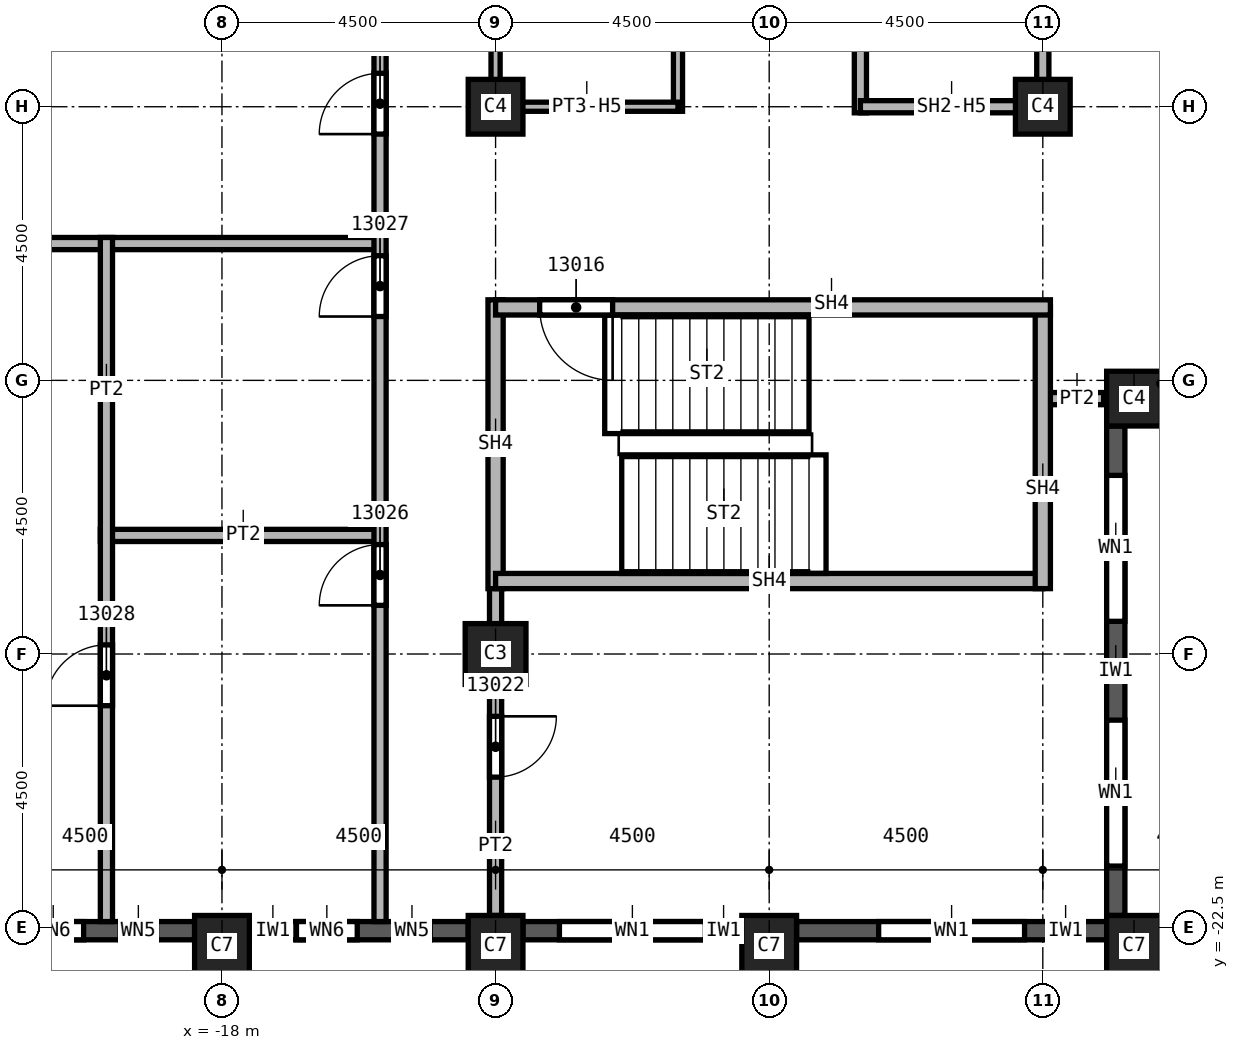
"""IFC4 building model, lengths in metres.
Left out: names, types, materials, properties, quantities, classifications, styles, units other than length and angle.
Written with IfcOpenShell. Run it as: python <this file> out.ifc"""

import sys

from ifc_helpers import new_model, si_unit, direction, frame, frame_2d, origin, origin_2d, place, context, subcontext, project, spatial, rectangle, extrude, element, fill, save


model = new_model("IFC4")
c1 = context("Model", 3, precision=1e-05, world=origin(), true_north=direction((0.0, 1.0)))
c2 = subcontext(c1, "Body", "Model", "MODEL_VIEW")
j1 = project(units=[si_unit("LENGTHUNIT", "METRE"), si_unit("PLANEANGLEUNIT", "RADIAN")], contexts=[c1])
p1 = place(None, origin())
s1 = spatial("IfcSite", under=j1, at=p1, CompositionType="ELEMENT")
p2 = place(p1, origin())
s2 = spatial("IfcBuilding", under=s1, at=p2, CompositionType="ELEMENT")
p3 = place(p2, frame((0.0, 0.0, 208.0)))
s3 = spatial("IfcBuildingStorey", under=s2, at=p3, CompositionType="ELEMENT", Elevation=208.0)
p4 = place(p3, frame((-13.5, -18.0, 0.0), z_axis=(0.0, 0.0, 1.0), x_axis=(1.0, 0.0, 0.0)))
e1 = element("IfcColumn", 1, at=p4, inside=s3, PredefinedType="COLUMN", context=c2, shape_type="SweptSolid", body=[
    extrude(rectangle(XDim=1.0, YDim=1.0, at=origin_2d()), origin(), (0.0, 0.0, 1.0), 3.72),
])
for number, where, z_axis, x_axis in (
    (2, (-4.5, -9.0, 0.0), (0.0, 0.0, 1.0), (1.0, 0.0, 0.0)),
    (3, (-13.5, -9.0, 0.0), (0.0, 0.0, 1.0), (1.0, 0.0, 0.0)),
):
    element("IfcColumn", number, at=place(p3, frame(where, z_axis=z_axis, x_axis=x_axis)), inside=s3, PredefinedType="COLUMN", context=c2, shape_type="SweptSolid", body=[
        extrude(rectangle(XDim=0.9, YDim=0.9, at=origin_2d()), origin(), (0.0, 0.0, 1.0), 3.72),
    ])
for number, where, z_axis, x_axis in (
    (4, (-3.0, -22.8, 0.0), (0.0, 0.0, 1.0), (1.0, 0.0, 0.0)),
    (5, (-9.0, -22.8, 0.0), (0.0, 0.0, 1.0), (1.0, 0.0, 0.0)),
    (6, (-13.5, -22.8, 0.0), (0.0, 0.0, 1.0), (1.0, 0.0, 0.0)),
    (7, (-18.0, -22.8, 0.0), (0.0, 0.0, 1.0), (1.0, 0.0, 0.0)),
):
    element("IfcColumn", number, at=place(p3, frame(where, z_axis=z_axis, x_axis=x_axis)), inside=s3, PredefinedType="COLUMN", context=c2, shape_type="SweptSolid", body=[
        extrude(rectangle(XDim=0.9, YDim=1.0, at=origin_2d()), origin(), (0.0, 0.0, 1.0), 3.72),
    ])
p5 = place(p3, frame((-3.0, -13.8, 0.0), z_axis=(0.0, 0.0, 1.0), x_axis=(1.0, 0.0, 0.0)))
e8 = element("IfcColumn", 8, at=p5, inside=s3, PredefinedType="COLUMN", context=c2, shape_type="SweptSolid", body=[
    extrude(rectangle(XDim=0.9, YDim=0.9, at=origin_2d()), origin(), (0.0, 0.0, 1.0), 3.72),
])
p6 = place(p3, frame((-22.05, -22.55, 0.0), z_axis=(0.0, 0.0, 1.0), x_axis=(1.0, 0.0, 0.0)))
e9 = element("IfcWall", 9, at=p6, inside=s3, PredefinedType="SOLIDWALL", context=c2, shape_type="SweptSolid", body=[
    extrude(rectangle(XDim=3.6, YDim=0.3, at=frame_2d((1.8, 0.0))), origin(), (0.0, 0.0, 1.0), 3.12),
])
p7 = place(p6, frame((0.775, 0.0, 0.8)))
e10 = element("IfcOpeningElement", 10, at=p7, cuts=e9, PredefinedType="OPENING", context=c2, shape_type="SweptSolid", body=[
    extrude(rectangle(XDim=1.0, YDim=1.95, at=frame_2d((0.5, 0.975))), frame((0.0, 0.15, 0.0), z_axis=(0.0, -1.0, 0.0), x_axis=(1.0, 0.0, 0.0)), (0.0, 0.0, 1.0), 0.3),
])
p8 = place(p6, frame((2.375, 0.0, 0.8)))
e11 = element("IfcOpeningElement", 11, at=p8, cuts=e9, PredefinedType="OPENING", context=c2, shape_type="SweptSolid", body=[
    extrude(rectangle(XDim=0.6, YDim=1.95, at=frame_2d((0.3, 0.975))), frame((0.0, 0.15, 0.0), z_axis=(0.0, -1.0, 0.0), x_axis=(1.0, 0.0, 0.0)), (0.0, 0.0, 1.0), 0.3),
])
p9 = place(p3, frame((-17.55, -22.55, 0.0), z_axis=(0.0, 0.0, 1.0), x_axis=(1.0, 0.0, 0.0)))
e12 = element("IfcWall", 12, at=p9, inside=s3, PredefinedType="SOLIDWALL", context=c2, shape_type="SweptSolid", body=[
    extrude(rectangle(XDim=3.6, YDim=0.3, at=frame_2d((1.8, 0.0))), origin(), (0.0, 0.0, 1.0), 3.12),
])
p10 = place(p9, frame((0.775, 0.0, 0.8)))
e13 = element("IfcOpeningElement", 13, at=p10, cuts=e12, PredefinedType="OPENING", context=c2, shape_type="SweptSolid", body=[
    extrude(rectangle(XDim=1.0, YDim=1.95, at=frame_2d((0.5, 0.975))), frame((0.0, 0.15, 0.0), z_axis=(0.0, -1.0, 0.0), x_axis=(1.0, 0.0, 0.0)), (0.0, 0.0, 1.0), 0.3),
])
p11 = place(p9, frame((2.375, 0.0, 0.8)))
e14 = element("IfcOpeningElement", 14, at=p11, cuts=e12, PredefinedType="OPENING", context=c2, shape_type="SweptSolid", body=[
    extrude(rectangle(XDim=0.6, YDim=1.95, at=frame_2d((0.3, 0.975))), frame((0.0, 0.15, 0.0), z_axis=(0.0, -1.0, 0.0), x_axis=(1.0, 0.0, 0.0)), (0.0, 0.0, 1.0), 0.3),
])
p12 = place(p3, frame((-13.05, -22.55, 0.0), z_axis=(0.0, 0.0, 1.0), x_axis=(1.0, 0.0, 0.0)))
e15 = element("IfcWall", 15, at=p12, inside=s3, PredefinedType="SOLIDWALL", context=c2, shape_type="SweptSolid", body=[
    extrude(rectangle(XDim=3.6, YDim=0.3, at=frame_2d((1.8, 0.0))), origin(), (0.0, 0.0, 1.0), 3.12),
])
p13 = place(p12, frame((0.6, 0.0, 0.8)))
e16 = element("IfcOpeningElement", 16, at=p13, cuts=e15, PredefinedType="OPENING", context=c2, shape_type="SweptSolid", body=[
    extrude(rectangle(XDim=2.4, YDim=1.95, at=frame_2d((1.2, 0.975))), frame((0.0, 0.15, 0.0), z_axis=(0.0, -1.0, 0.0), x_axis=(1.0, 0.0, 0.0)), (0.0, 0.0, 1.0), 0.3),
])
p14 = place(p3, frame((-8.55, -22.55, 0.0), z_axis=(0.0, 0.0, 1.0), x_axis=(1.0, 0.0, 0.0)))
e17 = element("IfcWall", 17, at=p14, inside=s3, PredefinedType="SOLIDWALL", context=c2, shape_type="SweptSolid", body=[
    extrude(rectangle(XDim=5.1, YDim=0.3, at=frame_2d((2.55, 0.0))), origin(), (0.0, 0.0, 1.0), 3.12),
])
p15 = place(p14, frame((1.35, 0.0, 0.8)))
e18 = element("IfcOpeningElement", 18, at=p15, cuts=e17, PredefinedType="OPENING", context=c2, shape_type="SweptSolid", body=[
    extrude(rectangle(XDim=2.4, YDim=1.95, at=frame_2d((1.2, 0.975))), frame((0.0, 0.15, 0.0), z_axis=(0.0, -1.0, 0.0), x_axis=(1.0, 0.0, 0.0)), (0.0, 0.0, 1.0), 0.3),
])
p16 = place(p3, frame((-3.3, -22.3, 0.0), z_axis=(0.0, 0.0, 1.0), x_axis=(0.0, 1.0, 0.0)))
e19 = element("IfcWall", 19, at=p16, inside=s3, PredefinedType="SOLIDWALL", context=c2, shape_type="SweptSolid", body=[
    extrude(rectangle(XDim=8.05, YDim=0.3, at=frame_2d((4.025, 0.0))), origin(), (0.0, 0.0, 1.0), 3.12),
])
p17 = place(p16, frame((0.812, 0.0, 0.8)))
e20 = element("IfcOpeningElement", 20, at=p17, cuts=e19, PredefinedType="OPENING", context=c2, shape_type="SweptSolid", body=[
    extrude(rectangle(XDim=2.4, YDim=1.95, at=frame_2d((1.2, 0.975))), frame((0.0, 0.15, 0.0), z_axis=(0.0, -1.0, 0.0), x_axis=(1.0, 0.0, 0.0)), (0.0, 0.0, 1.0), 0.3),
])
p18 = place(p16, frame((4.837, 0.0, 0.8)))
e21 = element("IfcOpeningElement", 21, at=p18, cuts=e19, PredefinedType="OPENING", context=c2, shape_type="SweptSolid", body=[
    extrude(rectangle(XDim=2.4, YDim=1.95, at=frame_2d((1.2, 0.975))), frame((0.0, 0.15, 0.0), z_axis=(0.0, -1.0, 0.0), x_axis=(1.0, 0.0, 0.0)), (0.0, 0.0, 1.0), 0.3),
])
p19 = place(p3, frame((-27.1, -11.25, 0.0), z_axis=(0.0, 0.0, 1.0), x_axis=(1.0, 0.0, 0.0)))
e22 = element("IfcWall", 22, at=p19, inside=s3, PredefinedType="PARTITIONING", context=c2, shape_type="SweptSolid", body=[
    extrude(rectangle(XDim=11.7, YDim=0.2, at=frame_2d((5.85, 0.0))), origin(), (0.0, 0.0, 1.0), 3.72),
])
p20 = place(p3, frame((-20.0, -16.05, 0.0), z_axis=(0.0, 0.0, 1.0), x_axis=(1.0, 0.0, 0.0)))
e23 = element("IfcWall", 23, at=p20, inside=s3, PredefinedType="PARTITIONING", context=c2, shape_type="SweptSolid", body=[
    extrude(rectangle(XDim=4.6, YDim=0.2, at=frame_2d((2.3, 0.0))), origin(), (0.0, 0.0, 1.0), 3.72),
])
p21 = place(p3, frame((-19.9, -22.4, 0.0), z_axis=(0.0, 0.0, 1.0), x_axis=(0.0, 1.0, 0.0)))
e24 = element("IfcWall", 24, at=p21, inside=s3, PredefinedType="PARTITIONING", context=c2, shape_type="SweptSolid", body=[
    extrude(rectangle(XDim=11.25, YDim=0.2, at=frame_2d((5.625, 0.0))), origin(), (0.0, 0.0, 1.0), 3.72),
])
p22 = place(p21, frame((3.55, 0.0, 0.0)))
e25 = element("IfcOpeningElement", 25, at=p22, cuts=e24, PredefinedType="OPENING", context=c2, shape_type="SweptSolid", body=[
    extrude(rectangle(XDim=1.0, YDim=2.1, at=frame_2d((0.5, 1.05))), frame((0.0, 0.1, 0.0), z_axis=(0.0, -1.0, 0.0), x_axis=(1.0, 0.0, 0.0)), (0.0, 0.0, 1.0), 0.2),
])
p23 = place(p3, frame((-15.4, -22.4, 0.0), z_axis=(0.0, 0.0, 1.0), x_axis=(0.0, 1.0, 0.0)))
e26 = element("IfcWall", 26, at=p23, inside=s3, PredefinedType="PARTITIONING", context=c2, shape_type="SweptSolid", body=[
    extrude(rectangle(XDim=23.25, YDim=0.2, at=frame_2d((11.625, 0.0))), origin(), (0.0, 0.0, 1.0), 3.72),
])
p24 = place(p23, frame((5.2, 0.0, 0.0)))
e27 = element("IfcOpeningElement", 27, at=p24, cuts=e26, PredefinedType="OPENING", context=c2, shape_type="SweptSolid", body=[
    extrude(rectangle(XDim=1.0, YDim=2.1, at=frame_2d((0.5, 1.05))), frame((0.0, 0.1, 0.0), z_axis=(0.0, -1.0, 0.0), x_axis=(1.0, 0.0, 0.0)), (0.0, 0.0, 1.0), 0.2),
])
p25 = place(p23, frame((9.95, 0.0, 0.0)))
e28 = element("IfcOpeningElement", 28, at=p25, cuts=e26, PredefinedType="OPENING", context=c2, shape_type="SweptSolid", body=[
    extrude(rectangle(XDim=1.0, YDim=2.1, at=frame_2d((0.5, 1.05))), frame((0.0, 0.1, 0.0), z_axis=(0.0, -1.0, 0.0), x_axis=(1.0, 0.0, 0.0)), (0.0, 0.0, 1.0), 0.2),
])
p26 = place(p23, frame((12.95, 0.0, 0.0)))
e29 = element("IfcOpeningElement", 29, at=p26, cuts=e26, PredefinedType="OPENING", context=c2, shape_type="SweptSolid", body=[
    extrude(rectangle(XDim=1.0, YDim=2.1, at=frame_2d((0.5, 1.05))), frame((0.0, 0.1, 0.0), z_axis=(0.0, -1.0, 0.0), x_axis=(1.0, 0.0, 0.0)), (0.0, 0.0, 1.0), 0.2),
])
p27 = place(p23, frame((16.1, 0.0, 0.0)))
e30 = element("IfcOpeningElement", 30, at=p27, cuts=e26, PredefinedType="OPENING", context=c2, shape_type="SweptSolid", body=[
    extrude(rectangle(XDim=1.0, YDim=2.1, at=frame_2d((0.5, 1.05))), frame((0.0, 0.1, 0.0), z_axis=(0.0, -1.0, 0.0), x_axis=(1.0, 0.0, 0.0)), (0.0, 0.0, 1.0), 0.2),
])
p28 = place(p3, frame((-13.5, -16.675, 0.0), z_axis=(0.0, 0.0, 1.0), x_axis=(0.0, -1.0, 0.0)))
e31 = element("IfcWall", 31, at=p28, inside=s3, PredefinedType="PARTITIONING", context=c2, shape_type="SweptSolid", body=[
    extrude(rectangle(XDim=5.625, YDim=0.2, at=frame_2d((2.812, 0.0))), origin(), (0.0, 0.0, 1.0), 3.72),
])
p29 = place(p28, frame((2.35, 0.0, 0.0)))
e32 = element("IfcOpeningElement", 32, at=p29, cuts=e31, PredefinedType="OPENING", context=c2, shape_type="SweptSolid", body=[
    extrude(rectangle(XDim=1.0, YDim=2.1, at=frame_2d((0.5, 1.05))), frame((0.0, 0.1, 0.0), z_axis=(0.0, -1.0, 0.0), x_axis=(1.0, 0.0, 0.0)), (0.0, 0.0, 1.0), 0.2),
])
p30 = place(p3, frame((-3.5, -13.8, 0.0), z_axis=(0.0, 0.0, 1.0), x_axis=(-1.0, 0.0, 0.0)))
e33 = element("IfcWall", 33, at=p30, inside=s3, PredefinedType="PARTITIONING", context=c2, shape_type="SweptSolid", body=[
    extrude(rectangle(XDim=1.0, YDim=0.2, at=frame_2d((0.5, 0.0))), origin(), (0.0, 0.0, 1.0), 3.72),
])
p31 = place(p3, frame((-7.5, -9.1, 0.0), z_axis=(0.0, 0.0, 1.0), x_axis=(0.0, 1.0, 0.0)))
e34 = element("IfcWall", 34, at=p31, inside=s3, PredefinedType="SOLIDWALL", context=c2, shape_type="SweptSolid", body=[
    extrude(rectangle(XDim=6.225, YDim=0.2, at=frame_2d((3.113, 0.0))), origin(), (0.0, 0.0, 1.0), 3.72),
])
p32 = place(p3, frame((-4.5, -9.0, 0.0), z_axis=(0.0, 0.0, 1.0), x_axis=(-1.0, 0.0, 0.0)))
e35 = element("IfcWall", 35, at=p32, inside=s3, PredefinedType="SOLIDWALL", context=c2, shape_type="SweptSolid", body=[
    extrude(rectangle(XDim=3.0, YDim=0.2, at=frame_2d((1.5, 0.0))), origin(), (0.0, 0.0, 1.0), 2.958),
])
p33 = place(p3, frame((-4.5, 0.0, 0.0), z_axis=(0.0, 0.0, 1.0), x_axis=(0.0, -1.0, 0.0)))
e36 = element("IfcWall", 36, at=p33, inside=s3, PredefinedType="SOLIDWALL", context=c2, shape_type="SweptSolid", body=[
    extrude(rectangle(XDim=9.1, YDim=0.2, at=frame_2d((4.55, 0.0))), origin(), (0.0, 0.0, 1.0), 2.958),
])
p34 = place(p33, frame((1.3, 0.0, 0.0)))
e37 = element("IfcOpeningElement", 37, at=p34, cuts=e36, PredefinedType="OPENING", context=c2, shape_type="SweptSolid", body=[
    extrude(rectangle(XDim=1.1, YDim=2.1, at=frame_2d((0.55, 1.05))), frame((0.0, 0.1, 0.0), z_axis=(0.0, -1.0, 0.0), x_axis=(1.0, 0.0, 0.0)), (0.0, 0.0, 1.0), 0.2),
])
p35 = place(p3, frame((-13.5, -12.175, 0.0), z_axis=(0.0, 0.0, 1.0), x_axis=(0.0, -1.0, 0.0)))
e38 = element("IfcWall", 38, at=p35, inside=s3, PredefinedType="SOLIDWALL", context=c2, shape_type="SweptSolid", body=[
    extrude(rectangle(XDim=4.75, YDim=0.25, at=frame_2d((2.375, 0.0))), origin(), (0.0, 0.0, 1.0), 3.72),
])
p36 = place(p3, frame((-4.5, -16.8, 0.0), z_axis=(0.0, 0.0, 1.0), x_axis=(-1.0, 0.0, 0.0)))
e39 = element("IfcWall", 39, at=p36, inside=s3, PredefinedType="SOLIDWALL", context=c2, shape_type="SweptSolid", body=[
    extrude(rectangle(XDim=9.0, YDim=0.25, at=frame_2d((4.5, 0.0))), origin(), (0.0, 0.0, 1.0), 3.72),
])
p37 = place(p3, frame((-4.5, -12.3, 0.0), z_axis=(0.0, 0.0, 1.0), x_axis=(0.0, -1.0, 0.0)))
e40 = element("IfcWall", 40, at=p37, inside=s3, PredefinedType="SOLIDWALL", context=c2, shape_type="SweptSolid", body=[
    extrude(rectangle(XDim=4.625, YDim=0.25, at=frame_2d((2.312, 0.0))), origin(), (0.0, 0.0, 1.0), 3.72),
])
p38 = place(p3, frame((-4.375, -12.3, 0.0), z_axis=(0.0, 0.0, 1.0), x_axis=(-1.0, 0.0, 0.0)))
e41 = element("IfcWall", 41, at=p38, inside=s3, PredefinedType="SOLIDWALL", context=c2, shape_type="SweptSolid", body=[
    extrude(rectangle(XDim=9.125, YDim=0.25, at=frame_2d((4.562, 0.0))), origin(), (0.0, 0.0, 1.0), 3.72),
])
p39 = place(p38, frame((7.2, 0.0, 0.0)))
e42 = element("IfcOpeningElement", 42, at=p39, cuts=e41, PredefinedType="OPENING", context=c2, shape_type="SweptSolid", body=[
    extrude(rectangle(XDim=1.2, YDim=2.1, at=frame_2d((0.6, 1.05))), frame((0.0, 0.125, 0.0), z_axis=(0.0, -1.0, 0.0), x_axis=(1.0, 0.0, 0.0)), (0.0, 0.0, 1.0), 0.25),
])
p40 = place(p3, frame((-13.5, -9.075, 0.0), z_axis=(0.0, 0.0, 1.0), x_axis=(0.0, 1.0, 0.0)))
e43 = element("IfcWall", 43, at=p40, inside=s3, PredefinedType="PARTITIONING", context=c2, shape_type="SweptSolid", body=[
    extrude(rectangle(XDim=4.075, YDim=0.15, at=frame_2d((2.038, 0.0))), origin(), (0.0, 0.0, 1.0), 2.958),
])
p41 = place(p3, frame((-10.5, -9.075, 0.0), z_axis=(0.0, 0.0, 1.0), x_axis=(0.0, 1.0, 0.0)))
e44 = element("IfcWall", 44, at=p41, inside=s3, PredefinedType="PARTITIONING", context=c2, shape_type="SweptSolid", body=[
    extrude(rectangle(XDim=4.15, YDim=0.15, at=frame_2d((2.075, 0.0))), origin(), (0.0, 0.0, 1.0), 3.72),
])
p42 = place(p41, frame((2.95, 0.0, 0.0)))
e45 = element("IfcOpeningElement", 45, at=p42, cuts=e44, PredefinedType="OPENING", context=c2, shape_type="SweptSolid", body=[
    extrude(rectangle(XDim=0.9, YDim=2.1, at=frame_2d((0.45, 1.05))), frame((0.0, 0.075, 0.0), z_axis=(0.0, -1.0, 0.0), x_axis=(1.0, 0.0, 0.0)), (0.0, 0.0, 1.0), 0.15),
])
p43 = place(p3, frame((-10.5, -9.0, 0.0), z_axis=(0.0, 0.0, 1.0), x_axis=(-1.0, 0.0, 0.0)))
e46 = element("IfcWall", 46, at=p43, inside=s3, PredefinedType="PARTITIONING", context=c2, shape_type="SweptSolid", body=[
    extrude(rectangle(XDim=3.0, YDim=0.15, at=frame_2d((1.5, 0.0))), origin(), (0.0, 0.0, 1.0), 2.958),
])
p44 = place(p13, origin())
e47 = element("IfcWindow", 47, at=p44, inside=s3, PartitioningType="SINGLE_PANEL", PredefinedType="WINDOW", context=c2, shape_type="SweptSolid", body=[
    extrude(rectangle(XDim=2.4, YDim=1.95, at=frame_2d((1.2, 0.975))), frame((0.0, 0.03, 0.0), z_axis=(0.0, -1.0, 0.0), x_axis=(1.0, 0.0, 0.0)), (0.0, 0.0, 1.0), 0.06),
])
fill(e16, e47)
p45 = place(p15, origin())
e48 = element("IfcWindow", 48, at=p45, inside=s3, PartitioningType="SINGLE_PANEL", PredefinedType="WINDOW", context=c2, shape_type="SweptSolid", body=[
    extrude(rectangle(XDim=2.4, YDim=1.95, at=frame_2d((1.2, 0.975))), frame((0.0, 0.03, 0.0), z_axis=(0.0, -1.0, 0.0), x_axis=(1.0, 0.0, 0.0)), (0.0, 0.0, 1.0), 0.06),
])
fill(e18, e48)
p46 = place(p17, origin())
e49 = element("IfcWindow", 49, at=p46, inside=s3, PartitioningType="SINGLE_PANEL", PredefinedType="WINDOW", context=c2, shape_type="SweptSolid", body=[
    extrude(rectangle(XDim=2.4, YDim=1.95, at=frame_2d((1.2, 0.975))), frame((0.0, 0.03, 0.0), z_axis=(0.0, -1.0, 0.0), x_axis=(1.0, 0.0, 0.0)), (0.0, 0.0, 1.0), 0.06),
])
fill(e20, e49)
p47 = place(p18, origin())
e50 = element("IfcWindow", 50, at=p47, inside=s3, PartitioningType="SINGLE_PANEL", PredefinedType="WINDOW", context=c2, shape_type="SweptSolid", body=[
    extrude(rectangle(XDim=2.4, YDim=1.95, at=frame_2d((1.2, 0.975))), frame((0.0, 0.03, 0.0), z_axis=(0.0, -1.0, 0.0), x_axis=(1.0, 0.0, 0.0)), (0.0, 0.0, 1.0), 0.06),
])
fill(e21, e50)
p48 = place(p39, origin())
e51 = element("IfcDoor", 51, at=p48, inside=s3, OperationType="SINGLE_SWING_LEFT", PredefinedType="DOOR", context=c2, shape_type="SweptSolid", body=[
    extrude(rectangle(XDim=1.2, YDim=2.1, at=frame_2d((0.6, 1.05))), frame((0.0, 0.025, 0.0), z_axis=(0.0, -1.0, 0.0), x_axis=(1.0, 0.0, 0.0)), (0.0, 0.0, 1.0), 0.05),
])
fill(e42, e51)
p49 = place(p29, origin())
e52 = element("IfcDoor", 52, at=p49, inside=s3, OperationType="SINGLE_SWING_LEFT", PredefinedType="DOOR", context=c2, shape_type="SweptSolid", body=[
    extrude(rectangle(XDim=1.0, YDim=2.1, at=frame_2d((0.5, 1.05))), frame((0.0, 0.025, 0.0), z_axis=(0.0, -1.0, 0.0), x_axis=(1.0, 0.0, 0.0)), (0.0, 0.0, 1.0), 0.05),
])
fill(e32, e52)
p50 = place(p24, origin())
e53 = element("IfcDoor", 53, at=p50, inside=s3, OperationType="SINGLE_SWING_LEFT", PredefinedType="DOOR", context=c2, shape_type="SweptSolid", body=[
    extrude(rectangle(XDim=1.0, YDim=2.1, at=frame_2d((0.5, 1.05))), frame((0.0, 0.025, 0.0), z_axis=(0.0, -1.0, 0.0), x_axis=(1.0, 0.0, 0.0)), (0.0, 0.0, 1.0), 0.05),
])
fill(e27, e53)
p51 = place(p25, origin())
e54 = element("IfcDoor", 54, at=p51, inside=s3, OperationType="SINGLE_SWING_RIGHT", PredefinedType="DOOR", context=c2, shape_type="SweptSolid", body=[
    extrude(rectangle(XDim=1.0, YDim=2.1, at=frame_2d((0.5, 1.05))), frame((0.0, 0.025, 0.0), z_axis=(0.0, -1.0, 0.0), x_axis=(1.0, 0.0, 0.0)), (0.0, 0.0, 1.0), 0.05),
])
fill(e28, e54)
p52 = place(p22, origin())
e55 = element("IfcDoor", 55, at=p52, inside=s3, OperationType="SINGLE_SWING_LEFT", PredefinedType="DOOR", context=c2, shape_type="SweptSolid", body=[
    extrude(rectangle(XDim=1.0, YDim=2.1, at=frame_2d((0.5, 1.05))), frame((0.0, 0.025, 0.0), z_axis=(0.0, -1.0, 0.0), x_axis=(1.0, 0.0, 0.0)), (0.0, 0.0, 1.0), 0.05),
])
fill(e25, e55)
p53 = place(p26, origin())
e56 = element("IfcDoor", 56, at=p53, inside=s3, OperationType="SINGLE_SWING_RIGHT", PredefinedType="DOOR", context=c2, shape_type="SweptSolid", body=[
    extrude(rectangle(XDim=1.0, YDim=2.1, at=frame_2d((0.5, 1.05))), frame((0.0, 0.025, 0.0), z_axis=(0.0, -1.0, 0.0), x_axis=(1.0, 0.0, 0.0)), (0.0, 0.0, 1.0), 0.05),
])
fill(e29, e56)
p54 = place(p7, origin())
e57 = element("IfcWindow", 57, at=p54, inside=s3, PartitioningType="SINGLE_PANEL", PredefinedType="WINDOW", context=c2, shape_type="SweptSolid", body=[
    extrude(rectangle(XDim=1.0, YDim=1.95, at=frame_2d((0.5, 0.975))), frame((0.0, 0.03, 0.0), z_axis=(0.0, -1.0, 0.0), x_axis=(1.0, 0.0, 0.0)), (0.0, 0.0, 1.0), 0.06),
])
fill(e10, e57)
p55 = place(p8, origin())
e58 = element("IfcWindow", 58, at=p55, inside=s3, PartitioningType="SINGLE_PANEL", PredefinedType="WINDOW", context=c2, shape_type="SweptSolid", body=[
    extrude(rectangle(XDim=0.6, YDim=1.95, at=frame_2d((0.3, 0.975))), frame((0.0, 0.03, 0.0), z_axis=(0.0, -1.0, 0.0), x_axis=(1.0, 0.0, 0.0)), (0.0, 0.0, 1.0), 0.06),
])
fill(e11, e58)
p56 = place(p10, origin())
e59 = element("IfcWindow", 59, at=p56, inside=s3, PartitioningType="SINGLE_PANEL", PredefinedType="WINDOW", context=c2, shape_type="SweptSolid", body=[
    extrude(rectangle(XDim=1.0, YDim=1.95, at=frame_2d((0.5, 0.975))), frame((0.0, 0.03, 0.0), z_axis=(0.0, -1.0, 0.0), x_axis=(1.0, 0.0, 0.0)), (0.0, 0.0, 1.0), 0.06),
])
fill(e13, e59)
p57 = place(p11, origin())
e60 = element("IfcWindow", 60, at=p57, inside=s3, PartitioningType="SINGLE_PANEL", PredefinedType="WINDOW", context=c2, shape_type="SweptSolid", body=[
    extrude(rectangle(XDim=0.6, YDim=1.95, at=frame_2d((0.3, 0.975))), frame((0.0, 0.03, 0.0), z_axis=(0.0, -1.0, 0.0), x_axis=(1.0, 0.0, 0.0)), (0.0, 0.0, 1.0), 0.06),
])
fill(e14, e60)
save(model, sys.argv[1])
